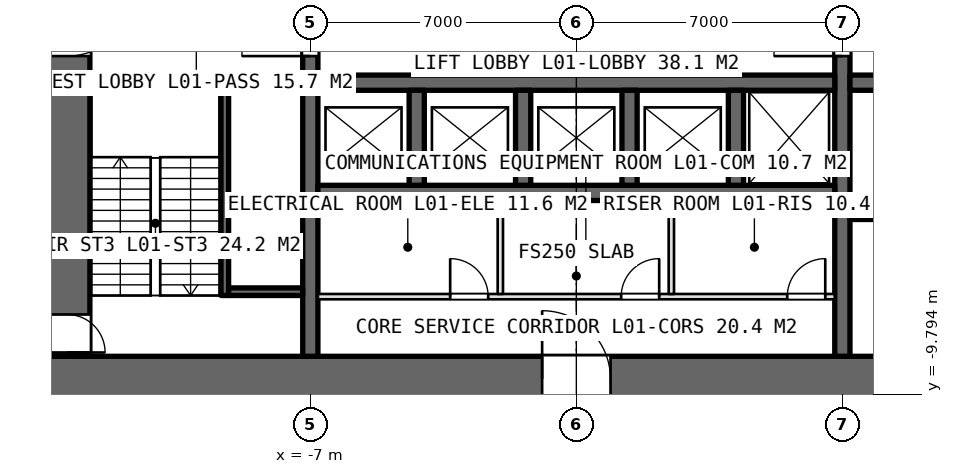
"""IFC4 building model, lengths in metres.
Left out: names, types, materials, properties, quantities, classifications, styles, units other than length and angle.
Written with IfcOpenShell. Run it as: python <this file> out.ifc"""

import sys

from ifc_helpers import new_model, si_unit, direction, frame, frame_2d, origin, place, context, subcontext, project, spatial, rectangle, extrude, element, fill, save


model = new_model("IFC4")
c1 = context("Model", 3, precision=1e-05, world=origin(), true_north=direction((0.0, 1.0)))
c2 = subcontext(c1, "Body", "Model", "MODEL_VIEW")
j1 = project(units=[si_unit("LENGTHUNIT", "METRE"), si_unit("PLANEANGLEUNIT", "RADIAN")], contexts=[c1])
p1 = place(None, origin())
s1 = spatial("IfcSite", under=j1, at=p1, CompositionType="ELEMENT")
p2 = place(p1, origin())
s2 = spatial("IfcBuilding", under=s1, at=p2, CompositionType="ELEMENT")
p3 = place(p2, frame((0.0, 0.0, 5.0)))
s3 = spatial("IfcBuildingStorey", under=s2, at=p3, CompositionType="ELEMENT", Elevation=5.0)
p4 = place(p3, frame((-14.0, -9.4, 0.0), z_axis=(0.0, 0.0, 1.0), x_axis=(1.0, 0.0, 0.0)))
e1 = element("IfcWall", 1, at=p4, inside=s3, PredefinedType="SHEAR", context=c2, shape_type="SweptSolid", body=[
    extrude(rectangle(XDim=28.0, YDim=1.2, at=frame_2d((14.0, 0.0))), origin(), (0.0, 0.0, 1.0), 5.0),
])
p5 = place(p4, frame((13.1, 0.0, 0.0)))
e2 = element("IfcOpeningElement", 2, at=p5, cuts=e1, PredefinedType="OPENING", context=c2, shape_type="SweptSolid", body=[
    extrude(rectangle(XDim=1.8, YDim=2.4, at=frame_2d((0.9, 1.2))), frame((0.0, 0.61, 0.0), z_axis=(0.0, -1.0, 0.0), x_axis=(1.0, 0.0, 0.0)), (0.0, 0.0, 1.0), 1.22),
])
p6 = place(p4, frame((22.9, 0.0, 0.0)))
e3 = element("IfcOpeningElement", 3, at=p6, cuts=e1, PredefinedType="OPENING", context=c2, shape_type="SweptSolid", body=[
    extrude(rectangle(XDim=2.2, YDim=2.7, at=frame_2d((1.1, 1.35))), frame((0.0, 0.61, 0.0), z_axis=(0.0, -1.0, 0.0), x_axis=(1.0, 0.0, 0.0)), (0.0, 0.0, 1.0), 1.22),
])
p7 = place(p3, frame((-13.4, 8.8, 0.0), z_axis=(0.0, 0.0, 1.0), x_axis=(0.0, -1.0, 0.0)))
e4 = element("IfcWall", 4, at=p7, inside=s3, PredefinedType="SHEAR", context=c2, shape_type="SweptSolid", body=[
    extrude(rectangle(XDim=17.6, YDim=1.2, at=frame_2d((8.8, 0.0))), origin(), (0.0, 0.0, 1.0), 5.0),
])
p8 = place(p7, frame((7.9, 0.0, 0.0)))
e5 = element("IfcOpeningElement", 5, at=p8, cuts=e4, PredefinedType="OPENING", context=c2, shape_type="SweptSolid", body=[
    extrude(rectangle(XDim=1.8, YDim=2.4, at=frame_2d((0.9, 1.2))), frame((0.0, 0.61, 0.0), z_axis=(0.0, -1.0, 0.0), x_axis=(1.0, 0.0, 0.0)), (0.0, 0.0, 1.0), 1.22),
])
p9 = place(p7, frame((16.5, 0.0, 0.0)))
e6 = element("IfcOpeningElement", 6, at=p9, cuts=e4, PredefinedType="OPENING", context=c2, shape_type="SweptSolid", body=[
    extrude(rectangle(XDim=1.0, YDim=2.4, at=frame_2d((0.5, 1.2))), frame((0.0, 0.61, 0.0), z_axis=(0.0, -1.0, 0.0), x_axis=(1.0, 0.0, 0.0)), (0.0, 0.0, 1.0), 1.22),
])
p10 = place(p3, frame((-7.0, -8.8, 0.0), z_axis=(0.0, 0.0, 1.0), x_axis=(0.0, 1.0, 0.0)))
e7 = element("IfcWall", 7, at=p10, inside=s3, PredefinedType="SHEAR", context=c2, shape_type="SweptSolid", body=[
    extrude(rectangle(XDim=17.6, YDim=0.4, at=frame_2d((8.8, 0.0))), origin(), (0.0, 0.0, 1.0), 5.0),
])
p11 = place(p10, frame((7.9, 0.0, 0.0)))
e8 = element("IfcOpeningElement", 8, at=p11, cuts=e7, PredefinedType="OPENING", context=c2, shape_type="SweptSolid", body=[
    extrude(rectangle(XDim=1.8, YDim=2.4, at=frame_2d((0.9, 1.2))), frame((0.0, 0.21, 0.0), z_axis=(0.0, -1.0, 0.0), x_axis=(1.0, 0.0, 0.0)), (0.0, 0.0, 1.0), 0.42),
])
p12 = place(p3, frame((7.0, -8.8, 0.0), z_axis=(0.0, 0.0, 1.0), x_axis=(0.0, 1.0, 0.0)))
e9 = element("IfcWall", 9, at=p12, inside=s3, PredefinedType="SHEAR", context=c2, shape_type="SweptSolid", body=[
    extrude(rectangle(XDim=17.6, YDim=0.4, at=frame_2d((8.8, 0.0))), origin(), (0.0, 0.0, 1.0), 5.0),
])
p13 = place(p12, frame((7.9, 0.0, 0.0)))
e10 = element("IfcOpeningElement", 10, at=p13, cuts=e9, PredefinedType="OPENING", context=c2, shape_type="SweptSolid", body=[
    extrude(rectangle(XDim=1.8, YDim=2.4, at=frame_2d((0.9, 1.2))), frame((0.0, 0.21, 0.0), z_axis=(0.0, -1.0, 0.0), x_axis=(1.0, 0.0, 0.0)), (0.0, 0.0, 1.0), 0.42),
])
for number, where, z_axis, x_axis in (
    (11, (-6.8, -1.6, 0.0), (0.0, 0.0, 1.0), (1.0, 0.0, 0.0)),
    (12, (-6.8, -4.5, 0.0), (0.0, 0.0, 1.0), (1.0, 0.0, 0.0)),
):
    element("IfcWall", number, at=place(p3, frame(where, z_axis=z_axis, x_axis=x_axis)), inside=s3, PredefinedType="SHEAR", context=c2, shape_type="SweptSolid", body=[
        extrude(rectangle(XDim=13.6, YDim=0.4, at=frame_2d((6.8, 0.0))), origin(), (0.0, 0.0, 1.0), 5.0),
    ])
p14 = place(p3, frame((-12.8, -1.6, 0.0), z_axis=(0.0, 0.0, 1.0), x_axis=(1.0, 0.0, 0.0)))
e13 = element("IfcWall", 13, at=p14, inside=s3, PredefinedType="SHEAR", context=c2, shape_type="SweptSolid", body=[
    extrude(rectangle(XDim=5.6, YDim=0.4, at=frame_2d((2.8, 0.0))), origin(), (0.0, 0.0, 1.0), 5.0),
])
p15 = place(p3, frame((7.2, -1.6, 0.0), z_axis=(0.0, 0.0, 1.0), x_axis=(1.0, 0.0, 0.0)))
e14 = element("IfcWall", 14, at=p15, inside=s3, PredefinedType="SHEAR", context=c2, shape_type="SweptSolid", body=[
    extrude(rectangle(XDim=5.6, YDim=0.4, at=frame_2d((2.8, 0.0))), origin(), (0.0, 0.0, 1.0), 5.0),
])
p16 = place(p15, frame((0.9, 0.0, 0.0)))
e15 = element("IfcOpeningElement", 15, at=p16, cuts=e14, PredefinedType="OPENING", context=c2, shape_type="SweptSolid", body=[
    extrude(rectangle(XDim=1.3, YDim=2.4, at=frame_2d((0.65, 1.2))), frame((0.0, 0.21, 0.0), z_axis=(0.0, -1.0, 0.0), x_axis=(1.0, 0.0, 0.0)), (0.0, 0.0, 1.0), 0.42),
])
p17 = place(p15, frame((3.9, 0.0, 0.0)))
e16 = element("IfcOpeningElement", 16, at=p17, cuts=e14, PredefinedType="OPENING", context=c2, shape_type="SweptSolid", body=[
    extrude(rectangle(XDim=1.3, YDim=2.4, at=frame_2d((0.65, 1.2))), frame((0.0, 0.21, 0.0), z_axis=(0.0, -1.0, 0.0), x_axis=(1.0, 0.0, 0.0)), (0.0, 0.0, 1.0), 0.42),
])
p18 = place(p3, frame((7.2, -5.0, 0.0), z_axis=(0.0, 0.0, 1.0), x_axis=(1.0, 0.0, 0.0)))
e17 = element("IfcWall", 17, at=p18, inside=s3, PredefinedType="SHEAR", context=c2, shape_type="SweptSolid", body=[
    extrude(rectangle(XDim=5.6, YDim=0.4, at=frame_2d((2.8, 0.0))), origin(), (0.0, 0.0, 1.0), 5.0),
])
for number, where, z_axis, x_axis in (
    (18, (-4.2, -4.3, 0.0), (0.0, 0.0, 1.0), (0.0, 1.0, 0.0)),
    (19, (-1.4, -4.3, 0.0), (0.0, 0.0, 1.0), (0.0, 1.0, 0.0)),
    (20, (1.4, -4.3, 0.0), (0.0, 0.0, 1.0), (0.0, 1.0, 0.0)),
    (21, (4.2, -4.3, 0.0), (0.0, 0.0, 1.0), (0.0, 1.0, 0.0)),
):
    element("IfcWall", number, at=place(p3, frame(where, z_axis=z_axis, x_axis=x_axis)), inside=s3, PredefinedType="SHEAR", context=c2, shape_type="SweptSolid", body=[
        extrude(rectangle(XDim=2.5, YDim=0.4, at=frame_2d((1.25, 0.0))), origin(), (0.0, 0.0, 1.0), 5.0),
    ])
p19 = place(p3, frame((-6.8, -7.23, 0.0), z_axis=(0.0, 0.0, 1.0), x_axis=(1.0, 0.0, 0.0)))
e22 = element("IfcWall", 22, at=p19, inside=s3, PredefinedType="PARTITIONING", context=c2, shape_type="SweptSolid", body=[
    extrude(rectangle(XDim=13.6, YDim=0.14, at=frame_2d((6.8, 0.0))), origin(), (0.0, 0.0, 1.0), 4.75),
])
p20 = place(p19, frame((3.48, 0.0, 0.0)))
e23 = element("IfcOpeningElement", 23, at=p20, cuts=e22, PredefinedType="OPENING", context=c2, shape_type="SweptSolid", body=[
    extrude(rectangle(XDim=1.0, YDim=2.4, at=frame_2d((0.5, 1.2))), frame((0.0, 0.08, 0.0), z_axis=(0.0, -1.0, 0.0), x_axis=(1.0, 0.0, 0.0)), (0.0, 0.0, 1.0), 0.16),
])
p21 = place(p19, frame((7.98, 0.0, 0.0)))
e24 = element("IfcOpeningElement", 24, at=p21, cuts=e22, PredefinedType="OPENING", context=c2, shape_type="SweptSolid", body=[
    extrude(rectangle(XDim=1.0, YDim=2.4, at=frame_2d((0.5, 1.2))), frame((0.0, 0.08, 0.0), z_axis=(0.0, -1.0, 0.0), x_axis=(1.0, 0.0, 0.0)), (0.0, 0.0, 1.0), 0.16),
])
p22 = place(p19, frame((12.35, 0.0, 0.0)))
e25 = element("IfcOpeningElement", 25, at=p22, cuts=e22, PredefinedType="OPENING", context=c2, shape_type="SweptSolid", body=[
    extrude(rectangle(XDim=1.0, YDim=2.4, at=frame_2d((0.5, 1.2))), frame((0.0, 0.08, 0.0), z_axis=(0.0, -1.0, 0.0), x_axis=(1.0, 0.0, 0.0)), (0.0, 0.0, 1.0), 0.16),
])
for number, where, z_axis, x_axis in (
    (26, (-2.0, -4.7, 0.0), (0.0, 0.0, 1.0), (0.0, -1.0, 0.0)),
    (27, (2.5, -4.7, 0.0), (0.0, 0.0, 1.0), (0.0, -1.0, 0.0)),
):
    element("IfcWall", number, at=place(p3, frame(where, z_axis=z_axis, x_axis=x_axis)), inside=s3, PredefinedType="PARTITIONING", context=c2, shape_type="SweptSolid", body=[
        extrude(rectangle(XDim=2.46, YDim=0.14, at=frame_2d((1.23, 0.0))), origin(), (0.0, 0.0, 1.0), 4.75),
    ])
p23 = place(p3, frame((-9.25, -7.2, 0.0), z_axis=(0.0, 0.0, 1.0), x_axis=(0.0, 1.0, 0.0)))
e28 = element("IfcWall", 28, at=p23, inside=s3, PredefinedType="SOLIDWALL", context=c2, shape_type="SweptSolid", body=[
    extrude(rectangle(XDim=5.4, YDim=0.2, at=frame_2d((2.7, 0.0))), origin(), (0.0, 0.0, 1.0), 5.0),
])
p24 = place(p3, frame((-9.15, -7.1, 0.0), z_axis=(0.0, 0.0, 1.0), x_axis=(1.0, 0.0, 0.0)))
e29 = element("IfcWall", 29, at=p24, inside=s3, PredefinedType="SOLIDWALL", context=c2, shape_type="SweptSolid", body=[
    extrude(rectangle(XDim=1.95, YDim=0.2, at=frame_2d((0.975, 0.0))), origin(), (0.0, 0.0, 1.0), 5.0),
])
p25 = place(p8, origin())
e30 = element("IfcDoor", 30, at=p25, inside=s3, OperationType="DOUBLE_DOOR_SINGLE_SWING", PredefinedType="DOOR", context=c2, shape_type="SweptSolid", body=[
    extrude(rectangle(XDim=1.8, YDim=2.4, at=frame_2d((0.9, 1.2))), frame((0.0, 0.025, 0.0), z_axis=(0.0, -1.0, 0.0), x_axis=(1.0, 0.0, 0.0)), (0.0, 0.0, 1.0), 0.05),
])
fill(e5, e30)
p26 = place(p11, origin())
e31 = element("IfcDoor", 31, at=p26, inside=s3, OperationType="DOUBLE_DOOR_SINGLE_SWING", PredefinedType="DOOR", context=c2, shape_type="SweptSolid", body=[
    extrude(rectangle(XDim=1.8, YDim=2.4, at=frame_2d((0.9, 1.2))), frame((0.0, 0.025, 0.0), z_axis=(0.0, -1.0, 0.0), x_axis=(1.0, 0.0, 0.0)), (0.0, 0.0, 1.0), 0.05),
])
fill(e8, e31)
p27 = place(p13, origin())
e32 = element("IfcDoor", 32, at=p27, inside=s3, OperationType="DOUBLE_DOOR_SINGLE_SWING", PredefinedType="DOOR", context=c2, shape_type="SweptSolid", body=[
    extrude(rectangle(XDim=1.8, YDim=2.4, at=frame_2d((0.9, 1.2))), frame((0.0, 0.025, 0.0), z_axis=(0.0, -1.0, 0.0), x_axis=(1.0, 0.0, 0.0)), (0.0, 0.0, 1.0), 0.05),
])
fill(e10, e32)
p28 = place(p9, origin())
e33 = element("IfcDoor", 33, at=p28, inside=s3, OperationType="SINGLE_SWING_RIGHT", PredefinedType="DOOR", context=c2, shape_type="SweptSolid", body=[
    extrude(rectangle(XDim=1.0, YDim=2.4, at=frame_2d((0.5, 1.2))), frame((0.0, 0.025, 0.0), z_axis=(0.0, -1.0, 0.0), x_axis=(1.0, 0.0, 0.0)), (0.0, 0.0, 1.0), 0.05),
])
fill(e6, e33)
p29 = place(p20, origin())
e34 = element("IfcDoor", 34, at=p29, inside=s3, OperationType="SINGLE_SWING_LEFT", PredefinedType="DOOR", context=c2, shape_type="SweptSolid", body=[
    extrude(rectangle(XDim=1.0, YDim=2.4, at=frame_2d((0.5, 1.2))), frame((0.0, 0.025, 0.0), z_axis=(0.0, -1.0, 0.0), x_axis=(1.0, 0.0, 0.0)), (0.0, 0.0, 1.0), 0.05),
])
fill(e23, e34)
p30 = place(p21, origin())
e35 = element("IfcDoor", 35, at=p30, inside=s3, OperationType="SINGLE_SWING_RIGHT", PredefinedType="DOOR", context=c2, shape_type="SweptSolid", body=[
    extrude(rectangle(XDim=1.0, YDim=2.4, at=frame_2d((0.5, 1.2))), frame((0.0, 0.025, 0.0), z_axis=(0.0, -1.0, 0.0), x_axis=(1.0, 0.0, 0.0)), (0.0, 0.0, 1.0), 0.05),
])
fill(e24, e35)
p31 = place(p22, origin())
e36 = element("IfcDoor", 36, at=p31, inside=s3, OperationType="SINGLE_SWING_RIGHT", PredefinedType="DOOR", context=c2, shape_type="SweptSolid", body=[
    extrude(rectangle(XDim=1.0, YDim=2.4, at=frame_2d((0.5, 1.2))), frame((0.0, 0.025, 0.0), z_axis=(0.0, -1.0, 0.0), x_axis=(1.0, 0.0, 0.0)), (0.0, 0.0, 1.0), 0.05),
])
fill(e25, e36)
p32 = place(p5, origin())
e37 = element("IfcDoor", 37, at=p32, inside=s3, OperationType="DOUBLE_DOOR_SINGLE_SWING", PredefinedType="DOOR", context=c2, shape_type="SweptSolid", body=[
    extrude(rectangle(XDim=1.8, YDim=2.4, at=frame_2d((0.9, 1.2))), frame((0.0, 0.025, 0.0), z_axis=(0.0, -1.0, 0.0), x_axis=(1.0, 0.0, 0.0)), (0.0, 0.0, 1.0), 0.05),
])
fill(e2, e37)
save(model, sys.argv[1])
